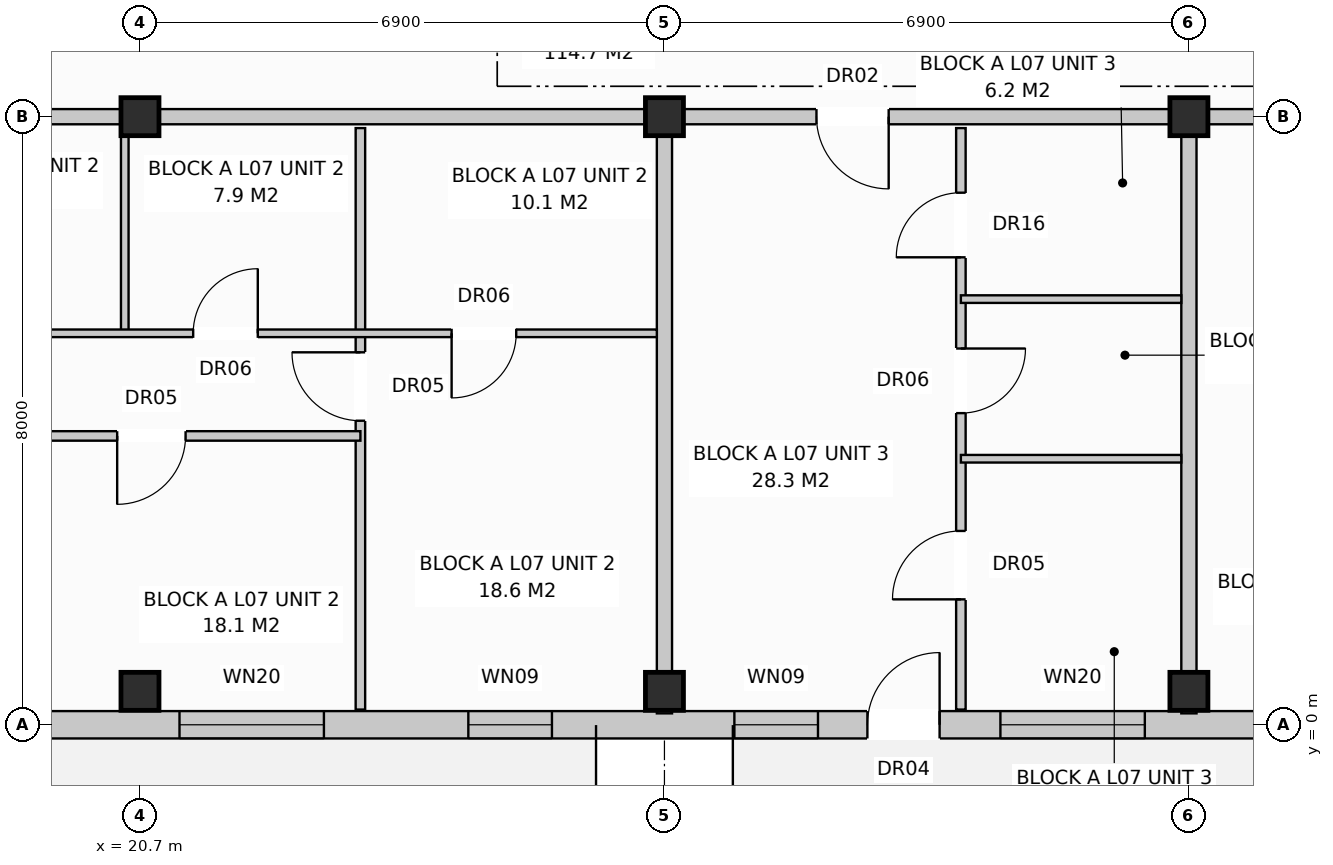
"""IFC4 building model, lengths in metres.
Left out: names, types, materials, properties, quantities, classifications, styles, units other than length and angle.
Written with IfcOpenShell. Run it as: python <this file> out.ifc"""

import sys

from ifc_helpers import new_model, si_unit, direction, frame, frame_2d, origin, origin_with_axes, origin_2d, place, context, subcontext, project, spatial, rectangle, extrude, element, fill, save


model = new_model("IFC4")
c1 = context("Model", 3, precision=1e-05, world=origin(), true_north=direction((0.0, 1.0)))
c2 = subcontext(c1, "Body", "Model", "MODEL_VIEW")
j1 = project(units=[si_unit("LENGTHUNIT", "METRE"), si_unit("PLANEANGLEUNIT", "RADIAN")], contexts=[c1])
p1 = place(None, origin())
s1 = spatial("IfcSite", under=j1, at=p1, CompositionType="ELEMENT")
p2 = place(p1, origin())
s2 = spatial("IfcBuilding", under=s1, at=p2, CompositionType="ELEMENT")
p3 = place(p2, frame((0.0, 0.0, 24.0)))
s3 = spatial("IfcBuildingStorey", under=s2, at=p3, CompositionType="ELEMENT", Elevation=24.0)
for number, where, z_axis, x_axis in (
    (1, (20.7, 0.44, 0.0), (0.0, 0.0, 1.0), (1.0, 0.0, 0.0)),
    (2, (20.7, 8.0, 0.0), (0.0, 0.0, 1.0), (1.0, 0.0, 0.0)),
    (3, (27.6, 0.44, 0.0), (0.0, 0.0, 1.0), (1.0, 0.0, 0.0)),
    (4, (27.6, 8.0, 0.0), (0.0, 0.0, 1.0), (1.0, 0.0, 0.0)),
    (5, (34.5, 0.44, 0.0), (0.0, 0.0, 1.0), (1.0, 0.0, 0.0)),
    (6, (34.5, 8.0, 0.0), (0.0, 0.0, 1.0), (1.0, 0.0, 0.0)),
):
    element("IfcColumn", number, at=place(p3, frame(where, z_axis=z_axis, x_axis=x_axis)), inside=s3, PredefinedType="COLUMN", context=c2, shape_type="SweptSolid", body=[
        extrude(rectangle(XDim=0.5, YDim=0.5, at=origin_2d()), origin(), (0.0, 0.0, 1.0), 3.2),
    ])
p4 = place(p3, frame((0.17, 0.0, 0.0), z_axis=(0.0, 0.0, 1.0), x_axis=(1.0, 0.0, 0.0)))
e7 = element("IfcWall", 7, at=p4, inside=s3, PredefinedType="STANDARD", context=c2, shape_type="SweptSolid", body=[
    extrude(rectangle(XDim=54.86, YDim=0.36, at=frame_2d((27.43, 0.0))), origin(), (0.0, 0.0, 1.0), 2.95),
])
p5 = place(p4, frame((2.5, 0.0, 0.0)))
e8 = element("IfcOpeningElement", 8, at=p5, cuts=e7, PredefinedType="OPENING", context=c2, shape_type="SweptSolid", body=[
    extrude(rectangle(XDim=0.95, YDim=2.1, at=frame_2d((0.475, 1.05))), frame((0.0, 0.192, 0.0), z_axis=(0.0, -1.0, 0.0), x_axis=(1.0, 0.0, 0.0)), (0.0, 0.0, 1.0), 0.384),
])
p6 = place(p4, frame((17.0, 0.0, 0.0)))
e9 = element("IfcOpeningElement", 9, at=p6, cuts=e7, PredefinedType="OPENING", context=c2, shape_type="SweptSolid", body=[
    extrude(rectangle(XDim=0.95, YDim=2.1, at=frame_2d((0.475, 1.05))), frame((0.0, 0.192, 0.0), z_axis=(0.0, -1.0, 0.0), x_axis=(1.0, 0.0, 0.0)), (0.0, 0.0, 1.0), 0.384),
])
p7 = place(p4, frame((30.1, 0.0, 0.0)))
e10 = element("IfcOpeningElement", 10, at=p7, cuts=e7, PredefinedType="OPENING", context=c2, shape_type="SweptSolid", body=[
    extrude(rectangle(XDim=0.95, YDim=2.1, at=frame_2d((0.475, 1.05))), frame((0.0, 0.192, 0.0), z_axis=(0.0, -1.0, 0.0), x_axis=(1.0, 0.0, 0.0)), (0.0, 0.0, 1.0), 0.384),
])
p8 = place(p4, frame((46.5, 0.0, 0.0)))
e11 = element("IfcOpeningElement", 11, at=p8, cuts=e7, PredefinedType="OPENING", context=c2, shape_type="SweptSolid", body=[
    extrude(rectangle(XDim=0.95, YDim=2.1, at=frame_2d((0.475, 1.05))), frame((0.0, 0.192, 0.0), z_axis=(0.0, -1.0, 0.0), x_axis=(1.0, 0.0, 0.0)), (0.0, 0.0, 1.0), 0.384),
])
p9 = place(p4, frame((0.75, 0.0, 0.72)))
e12 = element("IfcOpeningElement", 12, at=p9, cuts=e7, PredefinedType="OPENING", context=c2, shape_type="SweptSolid", body=[
    extrude(rectangle(XDim=1.1, YDim=1.5, at=frame_2d((0.55, 0.75))), frame((0.0, 0.192, 0.0), z_axis=(0.0, -1.0, 0.0), x_axis=(1.0, 0.0, 0.0)), (0.0, 0.0, 1.0), 0.384),
])
p10 = place(p4, frame((4.25, 0.0, 0.72)))
e13 = element("IfcOpeningElement", 13, at=p10, cuts=e7, PredefinedType="OPENING", context=c2, shape_type="SweptSolid", body=[
    extrude(rectangle(XDim=1.9, YDim=1.85, at=frame_2d((0.95, 0.925))), frame((0.0, 0.192, 0.0), z_axis=(0.0, -1.0, 0.0), x_axis=(1.0, 0.0, 0.0)), (0.0, 0.0, 1.0), 0.384),
])
p11 = place(p4, frame((8.925, 0.0, 0.8)))
e14 = element("IfcOpeningElement", 14, at=p11, cuts=e7, PredefinedType="OPENING", context=c2, shape_type="SweptSolid", body=[
    extrude(rectangle(XDim=1.95, YDim=1.65, at=frame_2d((0.975, 0.825))), frame((0.0, 0.192, 0.0), z_axis=(0.0, -1.0, 0.0), x_axis=(1.0, 0.0, 0.0)), (0.0, 0.0, 1.0), 0.384),
])
p12 = place(p4, frame((15.05, 0.0, 0.72)))
e15 = element("IfcOpeningElement", 15, at=p12, cuts=e7, PredefinedType="OPENING", context=c2, shape_type="SweptSolid", body=[
    extrude(rectangle(XDim=1.1, YDim=1.5, at=frame_2d((0.55, 0.75))), frame((0.0, 0.192, 0.0), z_axis=(0.0, -1.0, 0.0), x_axis=(1.0, 0.0, 0.0)), (0.0, 0.0, 1.0), 0.384),
])
p13 = place(p4, frame((21.05, 0.0, 0.72)))
e16 = element("IfcOpeningElement", 16, at=p13, cuts=e7, PredefinedType="OPENING", context=c2, shape_type="SweptSolid", body=[
    extrude(rectangle(XDim=1.9, YDim=1.85, at=frame_2d((0.95, 0.925))), frame((0.0, 0.192, 0.0), z_axis=(0.0, -1.0, 0.0), x_axis=(1.0, 0.0, 0.0)), (0.0, 0.0, 1.0), 0.384),
])
p14 = place(p4, frame((24.85, 0.0, 0.72)))
e17 = element("IfcOpeningElement", 17, at=p14, cuts=e7, PredefinedType="OPENING", context=c2, shape_type="SweptSolid", body=[
    extrude(rectangle(XDim=1.1, YDim=1.5, at=frame_2d((0.55, 0.75))), frame((0.0, 0.192, 0.0), z_axis=(0.0, -1.0, 0.0), x_axis=(1.0, 0.0, 0.0)), (0.0, 0.0, 1.0), 0.384),
])
p15 = place(p4, frame((28.35, 0.0, 0.72)))
e18 = element("IfcOpeningElement", 18, at=p15, cuts=e7, PredefinedType="OPENING", context=c2, shape_type="SweptSolid", body=[
    extrude(rectangle(XDim=1.1, YDim=1.5, at=frame_2d((0.55, 0.75))), frame((0.0, 0.192, 0.0), z_axis=(0.0, -1.0, 0.0), x_axis=(1.0, 0.0, 0.0)), (0.0, 0.0, 1.0), 0.384),
])
p16 = place(p4, frame((31.85, 0.0, 0.72)))
e19 = element("IfcOpeningElement", 19, at=p16, cuts=e7, PredefinedType="OPENING", context=c2, shape_type="SweptSolid", body=[
    extrude(rectangle(XDim=1.9, YDim=1.85, at=frame_2d((0.95, 0.925))), frame((0.0, 0.192, 0.0), z_axis=(0.0, -1.0, 0.0), x_axis=(1.0, 0.0, 0.0)), (0.0, 0.0, 1.0), 0.384),
])
p17 = place(p4, frame((35.525, 0.0, 0.8)))
e20 = element("IfcOpeningElement", 20, at=p17, cuts=e7, PredefinedType="OPENING", context=c2, shape_type="SweptSolid", body=[
    extrude(rectangle(XDim=1.95, YDim=1.65, at=frame_2d((0.975, 0.825))), frame((0.0, 0.192, 0.0), z_axis=(0.0, -1.0, 0.0), x_axis=(1.0, 0.0, 0.0)), (0.0, 0.0, 1.0), 0.384),
])
p18 = place(p4, frame((39.25, 0.0, 0.72)))
e21 = element("IfcOpeningElement", 21, at=p18, cuts=e7, PredefinedType="OPENING", context=c2, shape_type="SweptSolid", body=[
    extrude(rectangle(XDim=1.1, YDim=1.5, at=frame_2d((0.55, 0.75))), frame((0.0, 0.192, 0.0), z_axis=(0.0, -1.0, 0.0), x_axis=(1.0, 0.0, 0.0)), (0.0, 0.0, 1.0), 0.384),
])
p19 = place(p4, frame((42.45, 0.0, 0.8)))
e22 = element("IfcOpeningElement", 22, at=p19, cuts=e7, PredefinedType="OPENING", context=c2, shape_type="SweptSolid", body=[
    extrude(rectangle(XDim=1.9, YDim=1.85, at=frame_2d((0.95, 0.925))), frame((0.0, 0.192, 0.0), z_axis=(0.0, -1.0, 0.0), x_axis=(1.0, 0.0, 0.0)), (0.0, 0.0, 1.0), 0.384),
])
p20 = place(p4, frame((48.7, 0.0, 0.9)))
e23 = element("IfcOpeningElement", 23, at=p20, cuts=e7, PredefinedType="OPENING", context=c2, shape_type="SweptSolid", body=[
    extrude(rectangle(XDim=0.95, YDim=1.55, at=frame_2d((0.475, 0.775))), frame((0.0, 0.192, 0.0), z_axis=(0.0, -1.0, 0.0), x_axis=(1.0, 0.0, 0.0)), (0.0, 0.0, 1.0), 0.384),
])
p21 = place(p4, frame((51.5, 0.0, 0.8)))
e24 = element("IfcOpeningElement", 24, at=p21, cuts=e7, PredefinedType="OPENING", context=c2, shape_type="SweptSolid", body=[
    extrude(rectangle(XDim=1.8, YDim=1.7, at=frame_2d((0.9, 0.85))), frame((0.0, 0.192, 0.0), z_axis=(0.0, -1.0, 0.0), x_axis=(1.0, 0.0, 0.0)), (0.0, 0.0, 1.0), 0.384),
])
p22 = place(p3, frame((27.6, 7.85, 0.0), z_axis=(0.0, 0.0, 1.0), x_axis=(0.0, -1.0, 0.0)))
e25 = element("IfcWall", 25, at=p22, inside=s3, PredefinedType="PARTITIONING", context=c2, shape_type="SweptSolid", body=[
    extrude(rectangle(XDim=7.7, YDim=0.2, at=frame_2d((3.85, 0.0))), origin(), (0.0, 0.0, 1.0), 2.95),
])
p23 = place(p3, frame((6.9, 8.0, 0.0), z_axis=(0.0, 0.0, 1.0), x_axis=(1.0, 0.0, 0.0)))
e26 = element("IfcWall", 26, at=p23, inside=s3, PredefinedType="PARTITIONING", context=c2, shape_type="SweptSolid", body=[
    extrude(rectangle(XDim=20.7, YDim=0.2, at=frame_2d((10.35, 0.0))), origin(), (0.0, 0.0, 1.0), 2.39),
])
p24 = place(p23, frame((2.4, 0.0, 0.0)))
e27 = element("IfcOpeningElement", 27, at=p24, cuts=e26, PredefinedType="OPENING", context=c2, shape_type="SweptSolid", body=[
    extrude(rectangle(XDim=0.95, YDim=2.15, at=frame_2d((0.475, 1.075))), frame((0.0, 0.112, 0.0), z_axis=(0.0, -1.0, 0.0), x_axis=(1.0, 0.0, 0.0)), (0.0, 0.0, 1.0), 0.224),
])
p25 = place(p3, frame((20.5, 7.85, 0.0), z_axis=(0.0, 0.0, 1.0), x_axis=(0.0, -1.0, 0.0)))
e28 = element("IfcWall", 28, at=p25, inside=s3, PredefinedType="PARTITIONING", context=c2, shape_type="SweptSolid", body=[
    extrude(rectangle(XDim=2.7, YDim=0.1, at=frame_2d((1.35, 0.0))), origin(), (0.0, 0.0, 1.0), 2.95),
])
p26 = place(p3, frame((23.6, 7.85, 0.0), z_axis=(0.0, 0.0, 1.0), x_axis=(0.0, -1.0, 0.0)))
e29 = element("IfcWall", 29, at=p26, inside=s3, PredefinedType="PARTITIONING", context=c2, shape_type="SweptSolid", body=[
    extrude(rectangle(XDim=7.65, YDim=0.125, at=frame_2d((3.825, 0.0))), origin(), (0.0, 0.0, 1.0), 2.95),
])
p27 = place(p26, frame((2.95, 0.0, 0.0)))
e30 = element("IfcOpeningElement", 30, at=p27, cuts=e29, PredefinedType="OPENING", context=c2, shape_type="SweptSolid", body=[
    extrude(rectangle(XDim=0.9, YDim=2.1, at=frame_2d((0.45, 1.05))), frame((0.0, 0.074, 0.0), z_axis=(0.0, -1.0, 0.0), x_axis=(1.0, 0.0, 0.0)), (0.0, 0.0, 1.0), 0.149),
])
p28 = place(p3, frame((13.2, 5.15, 0.0), z_axis=(0.0, 0.0, 1.0), x_axis=(1.0, 0.0, 0.0)))
e31 = element("IfcWall", 31, at=p28, inside=s3, PredefinedType="PARTITIONING", context=c2, shape_type="SweptSolid", body=[
    extrude(rectangle(XDim=14.3, YDim=0.1, at=frame_2d((7.15, 0.0))), origin(), (0.0, 0.0, 1.0), 2.95),
])
p29 = place(p28, frame((1.6, 0.0, 0.0)))
e32 = element("IfcOpeningElement", 32, at=p29, cuts=e31, PredefinedType="OPENING", context=c2, shape_type="SweptSolid", body=[
    extrude(rectangle(XDim=0.9, YDim=2.1, at=frame_2d((0.45, 1.05))), frame((0.0, 0.062, 0.0), z_axis=(0.0, -1.0, 0.0), x_axis=(1.0, 0.0, 0.0)), (0.0, 0.0, 1.0), 0.124),
])
p30 = place(p28, frame((5.1, 0.0, 0.0)))
e33 = element("IfcOpeningElement", 33, at=p30, cuts=e31, PredefinedType="OPENING", context=c2, shape_type="SweptSolid", body=[
    extrude(rectangle(XDim=0.85, YDim=2.05, at=frame_2d((0.425, 1.025))), frame((0.0, 0.062, 0.0), z_axis=(0.0, -1.0, 0.0), x_axis=(1.0, 0.0, 0.0)), (0.0, 0.0, 1.0), 0.124),
])
p31 = place(p28, frame((8.2, 0.0, 0.0)))
e34 = element("IfcOpeningElement", 34, at=p31, cuts=e31, PredefinedType="OPENING", context=c2, shape_type="SweptSolid", body=[
    extrude(rectangle(XDim=0.85, YDim=2.05, at=frame_2d((0.425, 1.025))), frame((0.0, 0.062, 0.0), z_axis=(0.0, -1.0, 0.0), x_axis=(1.0, 0.0, 0.0)), (0.0, 0.0, 1.0), 0.124),
])
p32 = place(p28, frame((11.6, 0.0, 0.0)))
e35 = element("IfcOpeningElement", 35, at=p32, cuts=e31, PredefinedType="OPENING", context=c2, shape_type="SweptSolid", body=[
    extrude(rectangle(XDim=0.85, YDim=2.05, at=frame_2d((0.425, 1.025))), frame((0.0, 0.062, 0.0), z_axis=(0.0, -1.0, 0.0), x_axis=(1.0, 0.0, 0.0)), (0.0, 0.0, 1.0), 0.124),
])
p33 = place(p3, frame((13.2, 3.8, 0.0), z_axis=(0.0, 0.0, 1.0), x_axis=(1.0, 0.0, 0.0)))
e36 = element("IfcWall", 36, at=p33, inside=s3, PredefinedType="PARTITIONING", context=c2, shape_type="SweptSolid", body=[
    extrude(rectangle(XDim=10.4, YDim=0.125, at=frame_2d((5.2, 0.0))), origin(), (0.0, 0.0, 1.0), 2.95),
])
p34 = place(p33, frame((2.0, 0.0, 0.0)))
e37 = element("IfcOpeningElement", 37, at=p34, cuts=e36, PredefinedType="OPENING", context=c2, shape_type="SweptSolid", body=[
    extrude(rectangle(XDim=0.9, YDim=2.1, at=frame_2d((0.45, 1.05))), frame((0.0, 0.074, 0.0), z_axis=(0.0, -1.0, 0.0), x_axis=(1.0, 0.0, 0.0)), (0.0, 0.0, 1.0), 0.149),
])
p35 = place(p33, frame((7.2, 0.0, 0.0)))
e38 = element("IfcOpeningElement", 38, at=p35, cuts=e36, PredefinedType="OPENING", context=c2, shape_type="SweptSolid", body=[
    extrude(rectangle(XDim=0.9, YDim=2.1, at=frame_2d((0.45, 1.05))), frame((0.0, 0.074, 0.0), z_axis=(0.0, -1.0, 0.0), x_axis=(1.0, 0.0, 0.0)), (0.0, 0.0, 1.0), 0.149),
])
p36 = place(p3, frame((34.5, 7.85, 0.0), z_axis=(0.0, 0.0, 1.0), x_axis=(0.0, -1.0, 0.0)))
e39 = element("IfcWall", 39, at=p36, inside=s3, PredefinedType="PARTITIONING", context=c2, shape_type="SweptSolid", body=[
    extrude(rectangle(XDim=7.7, YDim=0.2, at=frame_2d((3.85, 0.0))), origin(), (0.0, 0.0, 1.0), 2.95),
])
p37 = place(p3, frame((27.6, 8.0, 0.0), z_axis=(0.0, 0.0, 1.0), x_axis=(1.0, 0.0, 0.0)))
e40 = element("IfcWall", 40, at=p37, inside=s3, PredefinedType="PARTITIONING", context=c2, shape_type="SweptSolid", body=[
    extrude(rectangle(XDim=6.9, YDim=0.2, at=frame_2d((3.45, 0.0))), origin(), (0.0, 0.0, 1.0), 2.39),
])
p38 = place(p37, frame((2.0, 0.0, 0.0)))
e41 = element("IfcOpeningElement", 41, at=p38, cuts=e40, PredefinedType="OPENING", context=c2, shape_type="SweptSolid", body=[
    extrude(rectangle(XDim=0.95, YDim=2.15, at=frame_2d((0.475, 1.075))), frame((0.0, 0.112, 0.0), z_axis=(0.0, -1.0, 0.0), x_axis=(1.0, 0.0, 0.0)), (0.0, 0.0, 1.0), 0.224),
])
p39 = place(p3, frame((31.5, 7.85, 0.0), z_axis=(0.0, 0.0, 1.0), x_axis=(0.0, -1.0, 0.0)))
e42 = element("IfcWall", 42, at=p39, inside=s3, PredefinedType="PARTITIONING", context=c2, shape_type="SweptSolid", body=[
    extrude(rectangle(XDim=7.65, YDim=0.125, at=frame_2d((3.825, 0.0))), origin(), (0.0, 0.0, 1.0), 2.95),
])
p40 = place(p39, frame((0.85, 0.0, 0.0)))
e43 = element("IfcOpeningElement", 43, at=p40, cuts=e42, PredefinedType="OPENING", context=c2, shape_type="SweptSolid", body=[
    extrude(rectangle(XDim=0.85, YDim=2.1, at=frame_2d((0.425, 1.05))), frame((0.0, 0.074, 0.0), z_axis=(0.0, -1.0, 0.0), x_axis=(1.0, 0.0, 0.0)), (0.0, 0.0, 1.0), 0.149),
])
p41 = place(p39, frame((2.9, 0.0, 0.0)))
e44 = element("IfcOpeningElement", 44, at=p41, cuts=e42, PredefinedType="OPENING", context=c2, shape_type="SweptSolid", body=[
    extrude(rectangle(XDim=0.85, YDim=2.05, at=frame_2d((0.425, 1.025))), frame((0.0, 0.074, 0.0), z_axis=(0.0, -1.0, 0.0), x_axis=(1.0, 0.0, 0.0)), (0.0, 0.0, 1.0), 0.149),
])
p42 = place(p39, frame((5.3, 0.0, 0.0)))
e45 = element("IfcOpeningElement", 45, at=p42, cuts=e42, PredefinedType="OPENING", context=c2, shape_type="SweptSolid", body=[
    extrude(rectangle(XDim=0.9, YDim=2.1, at=frame_2d((0.45, 1.05))), frame((0.0, 0.074, 0.0), z_axis=(0.0, -1.0, 0.0), x_axis=(1.0, 0.0, 0.0)), (0.0, 0.0, 1.0), 0.149),
])
for number, where, z_axis, x_axis in (
    (46, (31.5, 5.6, 0.0), (0.0, 0.0, 1.0), (1.0, 0.0, 0.0)),
    (47, (31.5, 3.5, 0.0), (0.0, 0.0, 1.0), (1.0, 0.0, 0.0)),
):
    element("IfcWall", number, at=place(p3, frame(where, z_axis=z_axis, x_axis=x_axis)), inside=s3, PredefinedType="PARTITIONING", context=c2, shape_type="SweptSolid", body=[
        extrude(rectangle(XDim=2.9, YDim=0.1, at=frame_2d((1.45, 0.0))), origin(), (0.0, 0.0, 1.0), 2.95),
    ])
p43 = place(p3, frame((34.5, 8.0, 0.0), z_axis=(0.0, 0.0, 1.0), x_axis=(1.0, 0.0, 0.0)))
e48 = element("IfcWall", 48, at=p43, inside=s3, PredefinedType="PARTITIONING", context=c2, shape_type="SweptSolid", body=[
    extrude(rectangle(XDim=6.9, YDim=0.2, at=frame_2d((3.45, 0.0))), origin(), (0.0, 0.0, 1.0), 2.39),
])
p44 = place(p43, frame((2.0, 0.0, 0.0)))
e49 = element("IfcOpeningElement", 49, at=p44, cuts=e48, PredefinedType="OPENING", context=c2, shape_type="SweptSolid", body=[
    extrude(rectangle(XDim=0.95, YDim=2.15, at=frame_2d((0.475, 1.075))), frame((0.0, 0.112, 0.0), z_axis=(0.0, -1.0, 0.0), x_axis=(1.0, 0.0, 0.0)), (0.0, 0.0, 1.0), 0.224),
])
p45 = place(p7, origin_with_axes())
e50 = element("IfcDoor", 50, at=p45, inside=s3, OperationType="SINGLE_SWING_RIGHT", PredefinedType="DOOR", context=c2, shape_type="SweptSolid", body=[
    extrude(rectangle(XDim=0.95, YDim=2.1, at=frame_2d((0.475, 1.05))), frame((0.0, 0.025, 0.0), z_axis=(0.0, -1.0, 0.0), x_axis=(1.0, 0.0, 0.0)), (0.0, 0.0, 1.0), 0.05),
])
fill(e10, e50)
p46 = place(p13, origin_with_axes())
e51 = element("IfcWindow", 51, at=p46, inside=s3, PartitioningType="SINGLE_PANEL", PredefinedType="WINDOW", context=c2, shape_type="SweptSolid", body=[
    extrude(rectangle(XDim=1.9, YDim=1.85, at=frame_2d((0.95, 0.925))), frame((0.0, 0.03, 0.0), z_axis=(0.0, -1.0, 0.0), x_axis=(1.0, 0.0, 0.0)), (0.0, 0.0, 1.0), 0.06),
])
fill(e16, e51)
p47 = place(p14, origin_with_axes())
e52 = element("IfcWindow", 52, at=p47, inside=s3, PartitioningType="SINGLE_PANEL", PredefinedType="WINDOW", context=c2, shape_type="SweptSolid", body=[
    extrude(rectangle(XDim=1.1, YDim=1.5, at=frame_2d((0.55, 0.75))), frame((0.0, 0.03, 0.0), z_axis=(0.0, -1.0, 0.0), x_axis=(1.0, 0.0, 0.0)), (0.0, 0.0, 1.0), 0.06),
])
fill(e17, e52)
p48 = place(p15, origin_with_axes())
e53 = element("IfcWindow", 53, at=p48, inside=s3, PartitioningType="SINGLE_PANEL", PredefinedType="WINDOW", context=c2, shape_type="SweptSolid", body=[
    extrude(rectangle(XDim=1.1, YDim=1.5, at=frame_2d((0.55, 0.75))), frame((0.0, 0.03, 0.0), z_axis=(0.0, -1.0, 0.0), x_axis=(1.0, 0.0, 0.0)), (0.0, 0.0, 1.0), 0.06),
])
fill(e18, e53)
p49 = place(p16, origin_with_axes())
e54 = element("IfcWindow", 54, at=p49, inside=s3, PartitioningType="SINGLE_PANEL", PredefinedType="WINDOW", context=c2, shape_type="SweptSolid", body=[
    extrude(rectangle(XDim=1.9, YDim=1.85, at=frame_2d((0.95, 0.925))), frame((0.0, 0.03, 0.0), z_axis=(0.0, -1.0, 0.0), x_axis=(1.0, 0.0, 0.0)), (0.0, 0.0, 1.0), 0.06),
])
fill(e19, e54)
p50 = place(p27, frame((0.9, 0.0, 0.0), z_axis=(0.0, 0.0, 1.0), x_axis=(-1.0, 0.0, 0.0)))
e55 = element("IfcDoor", 55, at=p50, inside=s3, OperationType="SINGLE_SWING_LEFT", PredefinedType="DOOR", context=c2, shape_type="SweptSolid", body=[
    extrude(rectangle(XDim=0.9, YDim=2.1, at=frame_2d((0.45, 1.05))), frame((0.0, 0.025, 0.0), z_axis=(0.0, -1.0, 0.0), x_axis=(1.0, 0.0, 0.0)), (0.0, 0.0, 1.0), 0.05),
])
fill(e30, e55)
p51 = place(p31, origin_with_axes())
e56 = element("IfcDoor", 56, at=p51, inside=s3, OperationType="SINGLE_SWING_RIGHT", PredefinedType="DOOR", context=c2, shape_type="SweptSolid", body=[
    extrude(rectangle(XDim=0.85, YDim=2.05, at=frame_2d((0.425, 1.025))), frame((0.0, 0.025, 0.0), z_axis=(0.0, -1.0, 0.0), x_axis=(1.0, 0.0, 0.0)), (0.0, 0.0, 1.0), 0.05),
])
fill(e34, e56)
p52 = place(p32, frame((0.85, 0.0, 0.0), z_axis=(0.0, 0.0, 1.0), x_axis=(-1.0, 0.0, 0.0)))
e57 = element("IfcDoor", 57, at=p52, inside=s3, OperationType="SINGLE_SWING_LEFT", PredefinedType="DOOR", context=c2, shape_type="SweptSolid", body=[
    extrude(rectangle(XDim=0.85, YDim=2.05, at=frame_2d((0.425, 1.025))), frame((0.0, 0.025, 0.0), z_axis=(0.0, -1.0, 0.0), x_axis=(1.0, 0.0, 0.0)), (0.0, 0.0, 1.0), 0.05),
])
fill(e35, e57)
p53 = place(p35, frame((0.9, 0.0, 0.0), z_axis=(0.0, 0.0, 1.0), x_axis=(-1.0, 0.0, 0.0)))
e58 = element("IfcDoor", 58, at=p53, inside=s3, OperationType="SINGLE_SWING_LEFT", PredefinedType="DOOR", context=c2, shape_type="SweptSolid", body=[
    extrude(rectangle(XDim=0.9, YDim=2.1, at=frame_2d((0.45, 1.05))), frame((0.0, 0.025, 0.0), z_axis=(0.0, -1.0, 0.0), x_axis=(1.0, 0.0, 0.0)), (0.0, 0.0, 1.0), 0.05),
])
fill(e38, e58)
p54 = place(p38, frame((0.95, 0.0, 0.0), z_axis=(0.0, 0.0, 1.0), x_axis=(-1.0, 0.0, 0.0)))
e59 = element("IfcDoor", 59, at=p54, inside=s3, OperationType="SINGLE_SWING_RIGHT", PredefinedType="DOOR", context=c2, shape_type="SweptSolid", body=[
    extrude(rectangle(XDim=0.95, YDim=2.15, at=frame_2d((0.475, 1.075))), frame((0.0, 0.025, 0.0), z_axis=(0.0, -1.0, 0.0), x_axis=(1.0, 0.0, 0.0)), (0.0, 0.0, 1.0), 0.05),
])
fill(e41, e59)
p55 = place(p40, frame((0.85, 0.0, 0.0), z_axis=(0.0, 0.0, 1.0), x_axis=(-1.0, 0.0, 0.0)))
e60 = element("IfcDoor", 60, at=p55, inside=s3, OperationType="SINGLE_SWING_RIGHT", PredefinedType="DOOR", context=c2, shape_type="SweptSolid", body=[
    extrude(rectangle(XDim=0.85, YDim=2.1, at=frame_2d((0.425, 1.05))), frame((0.0, 0.025, 0.0), z_axis=(0.0, -1.0, 0.0), x_axis=(1.0, 0.0, 0.0)), (0.0, 0.0, 1.0), 0.05),
])
fill(e43, e60)
p56 = place(p41, origin_with_axes())
e61 = element("IfcDoor", 61, at=p56, inside=s3, OperationType="SINGLE_SWING_LEFT", PredefinedType="DOOR", context=c2, shape_type="SweptSolid", body=[
    extrude(rectangle(XDim=0.85, YDim=2.05, at=frame_2d((0.425, 1.025))), frame((0.0, 0.025, 0.0), z_axis=(0.0, -1.0, 0.0), x_axis=(1.0, 0.0, 0.0)), (0.0, 0.0, 1.0), 0.05),
])
fill(e44, e61)
p57 = place(p42, frame((0.9, 0.0, 0.0), z_axis=(0.0, 0.0, 1.0), x_axis=(-1.0, 0.0, 0.0)))
e62 = element("IfcDoor", 62, at=p57, inside=s3, OperationType="SINGLE_SWING_RIGHT", PredefinedType="DOOR", context=c2, shape_type="SweptSolid", body=[
    extrude(rectangle(XDim=0.9, YDim=2.1, at=frame_2d((0.45, 1.05))), frame((0.0, 0.025, 0.0), z_axis=(0.0, -1.0, 0.0), x_axis=(1.0, 0.0, 0.0)), (0.0, 0.0, 1.0), 0.05),
])
fill(e45, e62)
save(model, sys.argv[1])
